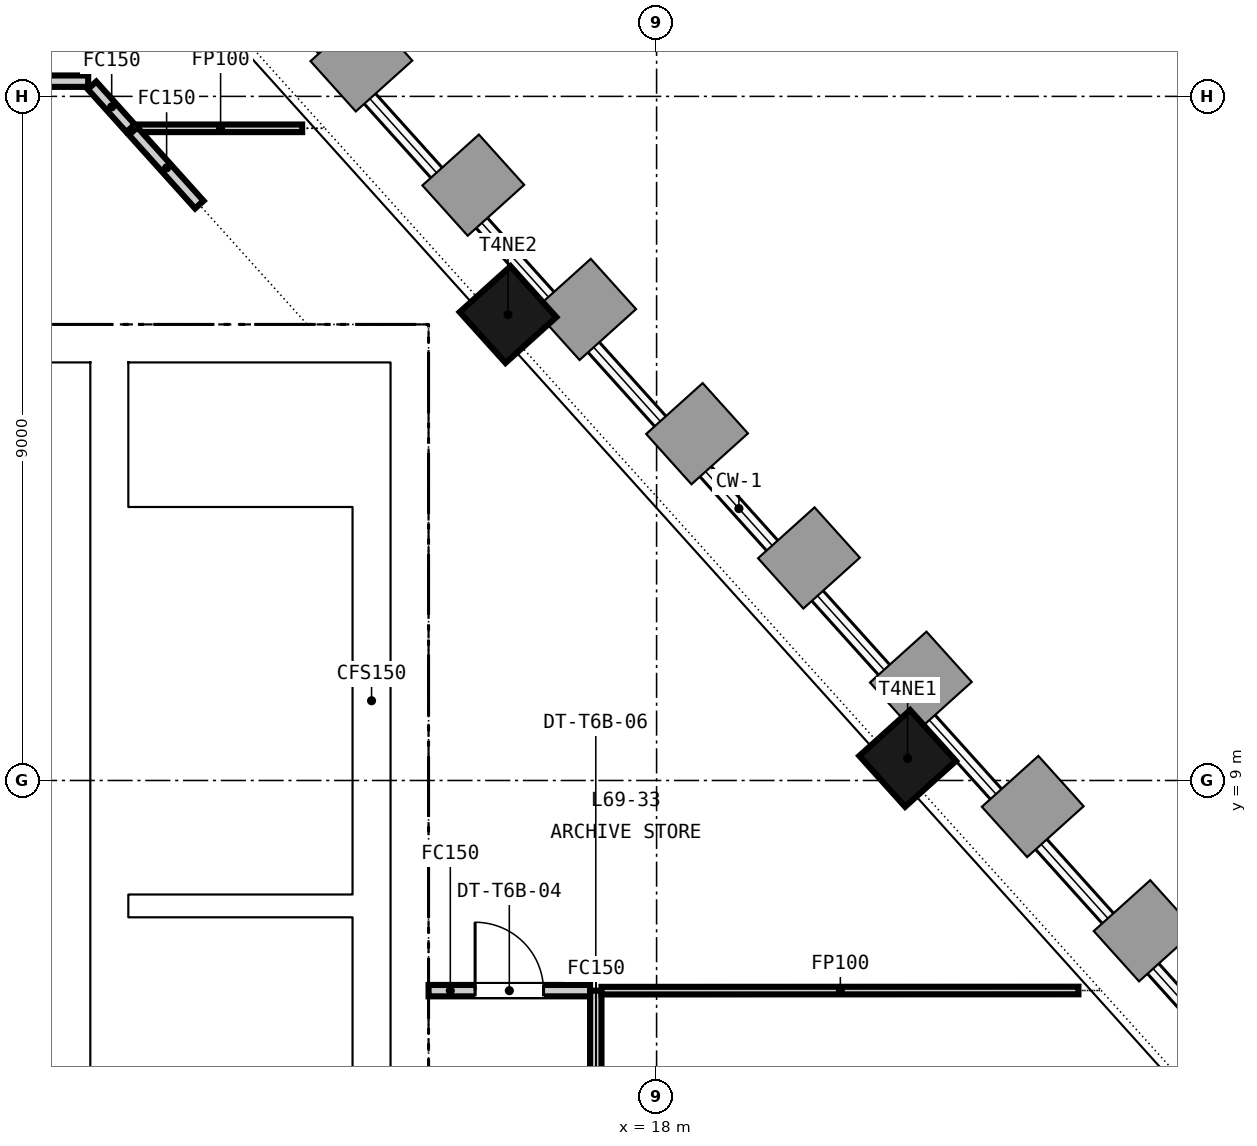
"""IFC4 building model, lengths in metres.
Left out: names, types, materials, properties, quantities, classifications, styles, units other than length and angle.
Written with IfcOpenShell. Run it as: python <this file> out.ifc"""

import sys

from ifc_helpers import new_model, si_unit, direction, frame, frame_2d, origin, origin_2d, place, context, subcontext, project, spatial, rectangle, extrude, element, fill, save


model = new_model("IFC4")
c1 = context("Model", 3, precision=1e-05, world=origin(), true_north=direction((0.0, 1.0)))
c2 = subcontext(c1, "Body", "Model", "MODEL_VIEW")
j1 = project(units=[si_unit("LENGTHUNIT", "METRE"), si_unit("PLANEANGLEUNIT", "RADIAN")], contexts=[c1])
p1 = place(None, origin())
s1 = spatial("IfcSite", under=j1, at=p1, CompositionType="ELEMENT")
p2 = place(p1, origin())
s2 = spatial("IfcBuilding", under=s1, at=p2, CompositionType="ELEMENT")
p3 = place(p2, frame((0.0, 0.0, 271.9)))
s3 = spatial("IfcBuildingStorey", under=s2, at=p3, CompositionType="ELEMENT", Elevation=271.9)
p4 = place(p3, frame((-15.0, 14.75, -0.15), z_axis=(0.0, 0.0, 1.0), x_axis=(1.0, 0.0, 0.0)))
e1 = element("IfcWall", 1, at=p4, inside=s3, PredefinedType="SOLIDWALL", context=c2, shape_type="SweptSolid", body=[
    extrude(rectangle(XDim=30.0, YDim=0.5, at=frame_2d((15.0, 0.0))), origin(), (0.0, 0.0, 1.0), 3.65),
])
p5 = place(p4, frame((9.25, 0.0, 0.15)))
e2 = element("IfcOpeningElement", 2, at=p5, cuts=e1, PredefinedType="OPENING", context=c2, shape_type="SweptSolid", body=[
    extrude(rectangle(XDim=1.5, YDim=2.1, at=frame_2d((0.75, 1.05))), frame((0.0, 0.26, 0.0), z_axis=(0.0, -1.0, 0.0), x_axis=(1.0, 0.0, 0.0)), (0.0, 0.0, 1.0), 0.52),
])
p6 = place(p4, frame((19.4, 0.0, 0.15)))
e3 = element("IfcOpeningElement", 3, at=p6, cuts=e1, PredefinedType="OPENING", context=c2, shape_type="SweptSolid", body=[
    extrude(rectangle(XDim=1.5, YDim=2.1, at=frame_2d((0.75, 1.05))), frame((0.0, 0.26, 0.0), z_axis=(0.0, -1.0, 0.0), x_axis=(1.0, 0.0, 0.0)), (0.0, 0.0, 1.0), 0.52),
])
p7 = place(p4, frame((1.5, 0.0, 0.15)))
e4 = element("IfcOpeningElement", 4, at=p7, cuts=e1, PredefinedType="OPENING", context=c2, shape_type="SweptSolid", body=[
    extrude(rectangle(XDim=1.2, YDim=2.1, at=frame_2d((0.6, 1.05))), frame((0.0, 0.26, 0.0), z_axis=(0.0, -1.0, 0.0), x_axis=(1.0, 0.0, 0.0)), (0.0, 0.0, 1.0), 0.52),
])
p8 = place(p4, frame((27.3, 0.0, 0.15)))
e5 = element("IfcOpeningElement", 5, at=p8, cuts=e1, PredefinedType="OPENING", context=c2, shape_type="SweptSolid", body=[
    extrude(rectangle(XDim=1.2, YDim=2.1, at=frame_2d((0.6, 1.05))), frame((0.0, 0.26, 0.0), z_axis=(0.0, -1.0, 0.0), x_axis=(1.0, 0.0, 0.0)), (0.0, 0.0, 1.0), 0.52),
])
for number, where, z_axis, x_axis in (
    (6, (14.75, 0.5, -0.15), (0.0, 0.0, 1.0), (0.0, 1.0, 0.0)),
    (7, (10.8, 0.5, -0.15), (0.0, 0.0, 1.0), (0.0, 1.0, 0.0)),
):
    element("IfcWall", number, at=place(p3, frame(where, z_axis=z_axis, x_axis=x_axis)), inside=s3, PredefinedType="SOLIDWALL", context=c2, shape_type="SweptSolid", body=[
        extrude(rectangle(XDim=14.0, YDim=0.5, at=frame_2d((7.0, 0.0))), origin(), (0.0, 0.0, 1.0), 3.65),
    ])
for number, where, z_axis, x_axis in (
    (8, (21.303, 9.29, -0.15), (0.0, 0.0, 1.0), (-0.669, 0.743, 0.0)),
    (9, (16.045, 15.129, -0.15), (0.0, 0.0, 1.0), (-0.669, 0.743, 0.0)),
):
    element("IfcColumn", number, at=place(p3, frame(where, z_axis=z_axis, x_axis=x_axis)), inside=s3, PredefinedType="COLUMN", context=c2, shape_type="SweptSolid", body=[
        extrude(rectangle(XDim=0.9, YDim=0.9, at=origin_2d()), origin(), (0.0, 0.0, 1.0), 3.65),
    ])
p9 = place(p3, frame((-10.55, 6.025, 0.0), z_axis=(0.0, 0.0, 1.0), x_axis=(1.0, 0.0, 0.0)))
e10 = element("IfcWall", 10, at=p9, inside=s3, PredefinedType="PARTITIONING", context=c2, shape_type="SweptSolid", body=[
    extrude(rectangle(XDim=21.1, YDim=0.25, at=frame_2d((10.55, 0.0))), origin(), (0.0, 0.0, 1.0), 3.5),
])
p10 = place(p3, frame((-4.125, 8.55, 0.0), z_axis=(0.0, 0.0, 1.0), x_axis=(1.0, 0.0, 0.0)))
e11 = element("IfcWall", 11, at=p10, inside=s3, PredefinedType="PARTITIONING", context=c2, shape_type="SweptSolid", body=[
    extrude(rectangle(XDim=14.675, YDim=0.2, at=frame_2d((7.337, 0.0))), origin(), (0.0, 0.0, 1.0), 3.5),
])
p11 = place(p10, frame((2.438, 0.0, 0.0)))
e12 = element("IfcOpeningElement", 12, at=p11, cuts=e11, PredefinedType="OPENING", context=c2, shape_type="SweptSolid", body=[
    extrude(rectangle(XDim=1.0, YDim=2.1, at=frame_2d((0.5, 1.05))), frame((0.0, 0.11, 0.0), z_axis=(0.0, -1.0, 0.0), x_axis=(1.0, 0.0, 0.0)), (0.0, 0.0, 1.0), 0.22),
])
p12 = place(p10, frame((6.775, 0.0, 0.0)))
e13 = element("IfcOpeningElement", 13, at=p12, cuts=e11, PredefinedType="OPENING", context=c2, shape_type="SweptSolid", body=[
    extrude(rectangle(XDim=1.0, YDim=2.1, at=frame_2d((0.5, 1.05))), frame((0.0, 0.11, 0.0), z_axis=(0.0, -1.0, 0.0), x_axis=(1.0, 0.0, 0.0)), (0.0, 0.0, 1.0), 0.22),
])
p13 = place(p10, frame((10.363, 0.0, 0.0)))
e14 = element("IfcOpeningElement", 14, at=p13, cuts=e11, PredefinedType="OPENING", context=c2, shape_type="SweptSolid", body=[
    extrude(rectangle(XDim=1.0, YDim=2.1, at=frame_2d((0.5, 1.05))), frame((0.0, 0.11, 0.0), z_axis=(0.0, -1.0, 0.0), x_axis=(1.0, 0.0, 0.0)), (0.0, 0.0, 1.0), 0.22),
])
p14 = place(p10, frame((13.475, 0.0, 0.0)))
e15 = element("IfcOpeningElement", 15, at=p14, cuts=e11, PredefinedType="OPENING", context=c2, shape_type="SweptSolid", body=[
    extrude(rectangle(XDim=0.9, YDim=2.1, at=frame_2d((0.45, 1.05))), frame((0.0, 0.11, 0.0), z_axis=(0.0, -1.0, 0.0), x_axis=(1.0, 0.0, 0.0)), (0.0, 0.0, 1.0), 0.22),
])
p15 = place(p3, frame((5.9, 11.2, 0.0), z_axis=(0.0, 0.0, 1.0), x_axis=(1.0, 0.0, 0.0)))
e16 = element("IfcWall", 16, at=p15, inside=s3, PredefinedType="PARTITIONING", context=c2, shape_type="SweptSolid", body=[
    extrude(rectangle(XDim=4.65, YDim=0.2, at=frame_2d((2.325, 0.0))), origin(), (0.0, 0.0, 1.0), 3.5),
])
p16 = place(p15, frame((1.075, 0.0, 0.0)))
e17 = element("IfcOpeningElement", 17, at=p16, cuts=e16, PredefinedType="OPENING", context=c2, shape_type="SweptSolid", body=[
    extrude(rectangle(XDim=0.9, YDim=2.1, at=frame_2d((0.45, 1.05))), frame((0.0, 0.11, 0.0), z_axis=(0.0, -1.0, 0.0), x_axis=(1.0, 0.0, 0.0)), (0.0, 0.0, 1.0), 0.22),
])
p17 = place(p15, frame((3.4, 0.0, 0.0)))
e18 = element("IfcOpeningElement", 18, at=p17, cuts=e16, PredefinedType="OPENING", context=c2, shape_type="SweptSolid", body=[
    extrude(rectangle(XDim=0.9, YDim=2.1, at=frame_2d((0.45, 1.05))), frame((0.0, 0.11, 0.0), z_axis=(0.0, -1.0, 0.0), x_axis=(1.0, 0.0, 0.0)), (0.0, 0.0, 1.0), 0.22),
])
p18 = place(p3, frame((11.05, 7.35, 0.0), z_axis=(0.0, 0.0, 1.0), x_axis=(1.0, 0.0, 0.0)))
e19 = element("IfcWall", 19, at=p18, inside=s3, PredefinedType="SOLIDWALL", context=c2, shape_type="SweptSolid", body=[
    extrude(rectangle(XDim=2.95, YDim=0.3, at=frame_2d((1.475, 0.0))), origin(), (0.0, 0.0, 1.0), 3.5),
])
p19 = place(p3, frame((14.25, 0.5, 0.0), z_axis=(0.0, 0.0, 1.0), x_axis=(0.0, 1.0, 0.0)))
e20 = element("IfcWall", 20, at=p19, inside=s3, PredefinedType="SOLIDWALL", context=c2, shape_type="SweptSolid", body=[
    extrude(rectangle(XDim=14.0, YDim=0.5, at=frame_2d((7.0, 0.0))), origin(), (0.0, 0.0, 1.0), 3.5),
])
p20 = place(p3, frame((17.2, 6.235, 0.0), z_axis=(0.0, 0.0, 1.0), x_axis=(0.0, -1.0, 0.0)))
e21 = element("IfcWall", 21, at=p20, inside=s3, PredefinedType="PARTITIONING", context=c2, shape_type="SweptSolid", body=[
    extrude(rectangle(XDim=9.96, YDim=0.15, at=frame_2d((4.98, 0.0))), origin(), (0.0, 0.0, 1.0), 2.751),
])
p21 = place(p20, frame((4.48, 0.0, 0.0)))
e22 = element("IfcOpeningElement", 22, at=p21, cuts=e21, PredefinedType="OPENING", context=c2, shape_type="SweptSolid", body=[
    extrude(rectangle(XDim=1.0, YDim=2.1, at=frame_2d((0.5, 1.05))), frame((0.0, 0.085, 0.0), z_axis=(0.0, -1.0, 0.0), x_axis=(1.0, 0.0, 0.0)), (0.0, 0.0, 1.0), 0.17),
])
p22 = place(p3, frame((4.675, 18.2, 0.0), z_axis=(0.0, 0.0, 1.0), x_axis=(1.0, 0.0, 0.0)))
e23 = element("IfcWall", 23, at=p22, inside=s3, PredefinedType="PARTITIONING", context=c2, shape_type="SweptSolid", body=[
    extrude(rectangle(XDim=5.847, YDim=0.15, at=frame_2d((2.923, 0.0))), origin(), (0.0, 0.0, 1.0), 2.751),
])
p23 = place(p22, frame((2.424, 0.0, 0.0)))
e24 = element("IfcOpeningElement", 24, at=p23, cuts=e23, PredefinedType="OPENING", context=c2, shape_type="SweptSolid", body=[
    extrude(rectangle(XDim=1.0, YDim=2.1, at=frame_2d((0.5, 1.05))), frame((0.0, 0.085, 0.0), z_axis=(0.0, -1.0, 0.0), x_axis=(1.0, 0.0, 0.0)), (0.0, 0.0, 1.0), 0.17),
])
p24 = place(p3, frame((10.572, 18.144, 0.0), z_axis=(0.0, 0.0, 1.0), x_axis=(0.668982500835, -0.743278153572, 0.0)))
e25 = element("IfcWall", 25, at=p24, inside=s3, PredefinedType="PARTITIONING", context=c2, shape_type="SweptSolid", body=[
    extrude(rectangle(XDim=0.759, YDim=0.15, at=frame_2d((0.379, 0.0))), origin(), (0.0, 0.0, 1.0), 2.751),
])
p25 = place(p3, frame((11.181, 17.58, 0.0), z_axis=(0.0, 0.0, 1.0), x_axis=(1.0, 0.0, 0.0)))
e26 = element("IfcWall", 26, at=p25, inside=s3, PredefinedType="PARTITIONING", context=c2, shape_type="SweptSolid", body=[
    extrude(rectangle(XDim=2.156, YDim=0.1, at=frame_2d((1.078, 0.0))), origin(), (0.0, 0.0, 1.0), 2.751),
])
p26 = place(p3, frame((11.114, 17.543, 0.0), z_axis=(0.0, 0.0, 1.0), x_axis=(0.66906841405, -0.743200818972, 0.0)))
e27 = element("IfcWall", 27, at=p26, inside=s3, PredefinedType="PARTITIONING", context=c2, shape_type="SweptSolid", body=[
    extrude(rectangle(XDim=1.301, YDim=0.15, at=frame_2d((0.65, 0.0))), origin(), (0.0, 0.0, 1.0), 2.751),
])
p27 = place(p3, frame((15.0, 6.235, 0.0), z_axis=(0.0, 0.0, 1.0), x_axis=(1.0, 0.0, 0.0)))
e28 = element("IfcWall", 28, at=p27, inside=s3, PredefinedType="PARTITIONING", context=c2, shape_type="SweptSolid", body=[
    extrude(rectangle(XDim=2.125, YDim=0.15, at=frame_2d((1.062, 0.0))), origin(), (0.0, 0.0, 1.0), 2.751),
])
p28 = place(p27, frame((0.613, 0.0, 0.0)))
e29 = element("IfcOpeningElement", 29, at=p28, cuts=e28, PredefinedType="OPENING", context=c2, shape_type="SweptSolid", body=[
    extrude(rectangle(XDim=0.9, YDim=2.1, at=frame_2d((0.45, 1.05))), frame((0.0, 0.085, 0.0), z_axis=(0.0, -1.0, 0.0), x_axis=(1.0, 0.0, 0.0)), (0.0, 0.0, 1.0), 0.17),
])
p29 = place(p3, frame((17.275, 6.235, 0.0), z_axis=(0.0, 0.0, 1.0), x_axis=(0.999999962915, 0.00027234174, 0.0)))
e30 = element("IfcWall", 30, at=p29, inside=s3, PredefinedType="PARTITIONING", context=c2, shape_type="SweptSolid", body=[
    extrude(rectangle(XDim=6.275, YDim=0.1, at=frame_2d((3.138, 0.0))), origin(), (0.0, 0.0, 1.0), 2.751),
])
p30 = place(p14, origin())
e31 = element("IfcDoor", 31, at=p30, inside=s3, OperationType="SINGLE_SWING_RIGHT", PredefinedType="DOOR", context=c2, shape_type="SweptSolid", body=[
    extrude(rectangle(XDim=0.9, YDim=2.1, at=frame_2d((0.45, 1.05))), frame((0.0, 0.025, 0.0), z_axis=(0.0, -1.0, 0.0), x_axis=(1.0, 0.0, 0.0)), (0.0, 0.0, 1.0), 0.05),
])
fill(e15, e31)
p31 = place(p17, origin())
e32 = element("IfcDoor", 32, at=p31, inside=s3, OperationType="SINGLE_SWING_LEFT", PredefinedType="DOOR", context=c2, shape_type="SweptSolid", body=[
    extrude(rectangle(XDim=0.9, YDim=2.1, at=frame_2d((0.45, 1.05))), frame((0.0, 0.025, 0.0), z_axis=(0.0, -1.0, 0.0), x_axis=(1.0, 0.0, 0.0)), (0.0, 0.0, 1.0), 0.05),
])
fill(e18, e32)
p32 = place(p8, origin())
e33 = element("IfcDoor", 33, at=p32, inside=s3, OperationType="SINGLE_SWING_LEFT", PredefinedType="DOOR", context=c2, shape_type="SweptSolid", body=[
    extrude(rectangle(XDim=1.2, YDim=2.1, at=frame_2d((0.6, 1.05))), frame((0.0, 0.025, 0.0), z_axis=(0.0, -1.0, 0.0), x_axis=(1.0, 0.0, 0.0)), (0.0, 0.0, 1.0), 0.05),
])
fill(e5, e33)
p33 = place(p28, origin())
e34 = element("IfcDoor", 34, at=p33, inside=s3, OperationType="SINGLE_SWING_LEFT", PredefinedType="DOOR", context=c2, shape_type="SweptSolid", body=[
    extrude(rectangle(XDim=0.9, YDim=2.1, at=frame_2d((0.45, 1.05))), frame((0.0, 0.025, 0.0), z_axis=(0.0, -1.0, 0.0), x_axis=(1.0, 0.0, 0.0)), (0.0, 0.0, 1.0), 0.05),
])
fill(e29, e34)
save(model, sys.argv[1])
